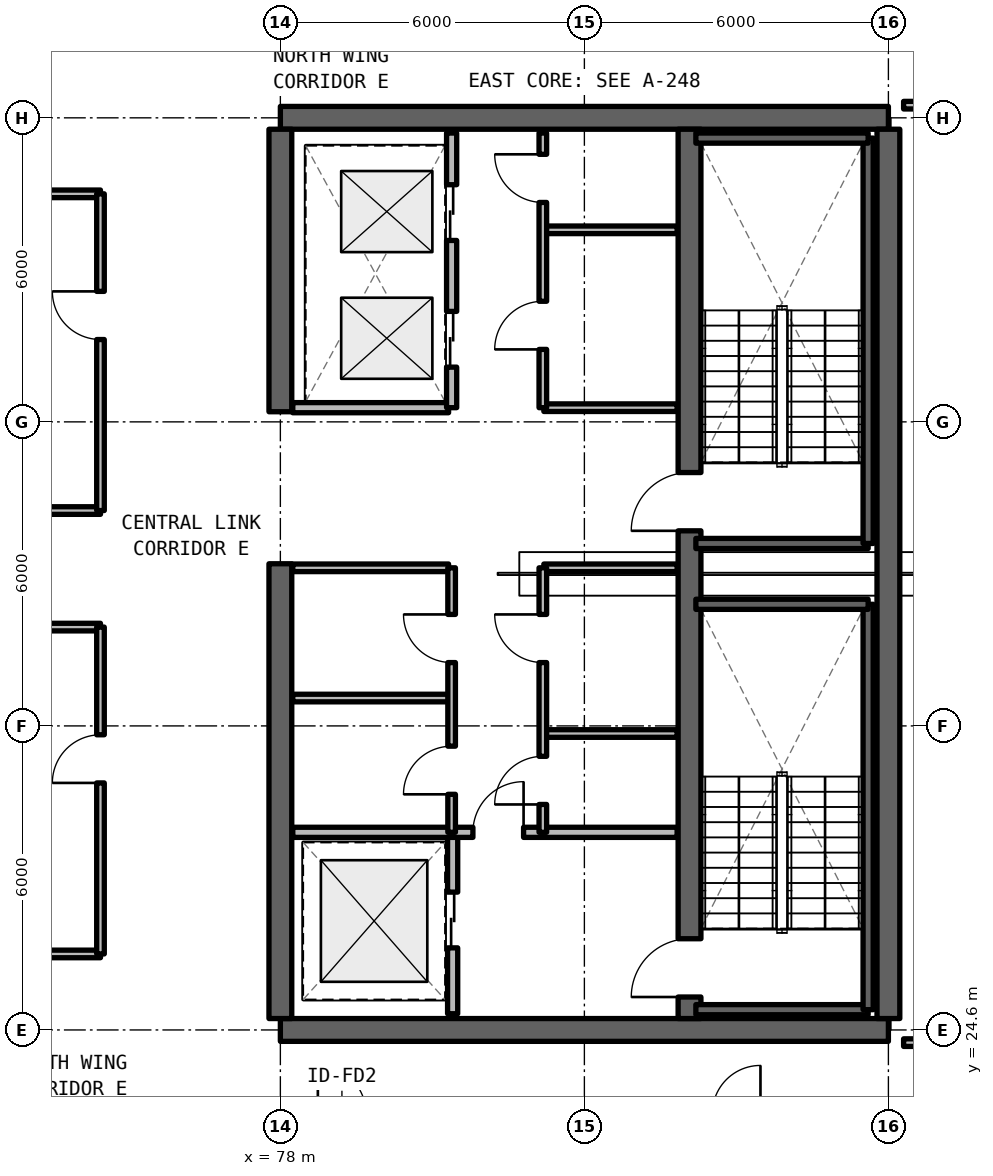
"""IFC4 building model, lengths in metres.
Left out: names, types, materials, properties, quantities, classifications, styles, units other than length and angle.
Written with IfcOpenShell. Run it as: python <this file> out.ifc"""

import sys

from ifc_helpers import new_model, si_unit, direction, frame, frame_2d, origin, place, context, subcontext, project, spatial, rectangle, extrude, element, fill, save


model = new_model("IFC4")
c1 = context("Model", 3, precision=1e-05, world=origin(), true_north=direction((0.0, 1.0)))
c2 = subcontext(c1, "Body", "Model", "MODEL_VIEW")
j1 = project(units=[si_unit("LENGTHUNIT", "METRE"), si_unit("PLANEANGLEUNIT", "RADIAN")], contexts=[c1])
p1 = place(None, origin())
s1 = spatial("IfcSite", under=j1, at=p1, CompositionType="ELEMENT")
p2 = place(p1, origin())
s2 = spatial("IfcBuilding", under=s1, at=p2, CompositionType="ELEMENT")
p3 = place(p2, frame((0.0, 0.0, 246.18)))
s3 = spatial("IfcBuildingStorey", under=s2, at=p3, CompositionType="ELEMENT", Elevation=246.18)
for number, where, z_axis, x_axis in (
    (1, (78.0, 24.6, 0.0), (0.0, 0.0, 1.0), (1.0, 0.0, 0.0)),
    (2, (90.0, 42.6, 0.0), (0.0, 0.0, 1.0), (-1.0, 0.0, 0.0)),
):
    element("IfcWall", number, at=place(p3, frame(where, z_axis=z_axis, x_axis=x_axis)), inside=s3, PredefinedType="SHEAR", context=c2, shape_type="SweptSolid", body=[
        extrude(rectangle(XDim=12.0, YDim=0.45, at=frame_2d((6.0, 0.0))), origin(), (0.0, 0.0, 1.0), 3.63),
    ])
p4 = place(p3, frame((90.0, 24.825, 0.0), z_axis=(0.0, 0.0, 1.0), x_axis=(0.0, 1.0, 0.0)))
e3 = element("IfcWall", 3, at=p4, inside=s3, PredefinedType="SHEAR", context=c2, shape_type="SweptSolid", body=[
    extrude(rectangle(XDim=17.55, YDim=0.45, at=frame_2d((8.775, 0.0))), origin(), (0.0, 0.0, 1.0), 3.63),
])
p5 = place(p3, frame((78.0, 24.825, 0.0), z_axis=(0.0, 0.0, 1.0), x_axis=(0.0, 1.0, 0.0)))
e4 = element("IfcWall", 4, at=p5, inside=s3, PredefinedType="SHEAR", context=c2, shape_type="SweptSolid", body=[
    extrude(rectangle(XDim=8.975, YDim=0.45, at=frame_2d((4.488, 0.0))), origin(), (0.0, 0.0, 1.0), 3.63),
])
p6 = place(p3, frame((78.0, 36.8, 0.0), z_axis=(0.0, 0.0, 1.0), x_axis=(0.0, 1.0, 0.0)))
e5 = element("IfcWall", 5, at=p6, inside=s3, PredefinedType="SHEAR", context=c2, shape_type="SweptSolid", body=[
    extrude(rectangle(XDim=5.575, YDim=0.45, at=frame_2d((2.788, 0.0))), origin(), (0.0, 0.0, 1.0), 3.63),
])
p7 = place(p3, frame((86.075, 24.825, 0.0), z_axis=(0.0, 0.0, 1.0), x_axis=(0.0, 1.0, 0.0)))
e6 = element("IfcWall", 6, at=p7, inside=s3, PredefinedType="SHEAR", context=c2, shape_type="SweptSolid", body=[
    extrude(rectangle(XDim=17.55, YDim=0.45, at=frame_2d((8.775, 0.0))), origin(), (0.0, 0.0, 1.0), 3.63),
])
p8 = place(p7, frame((0.425, 0.0, 0.0)))
e7 = element("IfcOpeningElement", 7, at=p8, cuts=e6, PredefinedType="OPENING", context=c2, shape_type="SweptSolid", body=[
    extrude(rectangle(XDim=1.15, YDim=2.15, at=frame_2d((0.575, 1.075))), frame((0.0, 0.235, 0.0), z_axis=(0.0, -1.0, 0.0), x_axis=(1.0, 0.0, 0.0)), (0.0, 0.0, 1.0), 0.47),
])
p9 = place(p7, frame((9.625, 0.0, 0.0)))
e8 = element("IfcOpeningElement", 8, at=p9, cuts=e6, PredefinedType="OPENING", context=c2, shape_type="SweptSolid", body=[
    extrude(rectangle(XDim=1.15, YDim=2.15, at=frame_2d((0.575, 1.075))), frame((0.0, 0.235, 0.0), z_axis=(0.0, -1.0, 0.0), x_axis=(1.0, 0.0, 0.0)), (0.0, 0.0, 1.0), 0.47),
])
p10 = place(p3, frame((81.4, 24.92, 0.0), z_axis=(0.0, 0.0, 1.0), x_axis=(0.0, 1.0, 0.0)))
e9 = element("IfcWall", 9, at=p10, inside=s3, PredefinedType="SOLIDWALL", context=c2, shape_type="SweptSolid", body=[
    extrude(rectangle(XDim=3.58, YDim=0.2, at=frame_2d((1.79, 0.0))), origin(), (0.0, 0.0, 1.0), 2.63),
])
p11 = place(p10, frame((1.3, 0.0, 0.0)))
e10 = element("IfcOpeningElement", 10, at=p11, cuts=e9, PredefinedType="OPENING", context=c2, shape_type="SweptSolid", body=[
    extrude(rectangle(XDim=1.1, YDim=2.2, at=frame_2d((0.55, 1.1))), frame((0.0, 0.11, 0.0), z_axis=(0.0, -1.0, 0.0), x_axis=(1.0, 0.0, 0.0)), (0.0, 0.0, 1.0), 0.22),
])
p12 = place(p3, frame((78.245, 28.5, 0.0), z_axis=(0.0, 0.0, 1.0), x_axis=(1.0, 0.0, 0.0)))
e11 = element("IfcWall", 11, at=p12, inside=s3, PredefinedType="SOLIDWALL", context=c2, shape_type="SweptSolid", body=[
    extrude(rectangle(XDim=7.585, YDim=0.2, at=frame_2d((3.792, 0.0))), origin(), (0.0, 0.0, 1.0), 2.63),
])
p13 = place(p12, frame((3.555, 0.0, 0.0)))
e12 = element("IfcOpeningElement", 12, at=p13, cuts=e11, PredefinedType="OPENING", context=c2, shape_type="SweptSolid", body=[
    extrude(rectangle(XDim=1.0, YDim=2.15, at=frame_2d((0.5, 1.075))), frame((0.0, 0.11, 0.0), z_axis=(0.0, -1.0, 0.0), x_axis=(1.0, 0.0, 0.0)), (0.0, 0.0, 1.0), 0.22),
])
for number, where, z_axis, x_axis in (
    (13, (83.2, 30.45, 0.0), (0.0, 0.0, 1.0), (1.0, 0.0, 0.0)),
    (14, (83.2, 33.72, 0.0), (0.0, 0.0, 1.0), (1.0, 0.0, 0.0)),
):
    element("IfcWall", number, at=place(p3, frame(where, z_axis=z_axis, x_axis=x_axis)), inside=s3, PredefinedType="SOLIDWALL", context=c2, shape_type="SweptSolid", body=[
        extrude(rectangle(XDim=2.63, YDim=0.15, at=frame_2d((1.315, 0.0))), origin(), (0.0, 0.0, 1.0), 2.63),
    ])
p14 = place(p3, frame((83.18, 28.5, 0.0), z_axis=(0.0, 0.0, 1.0), x_axis=(0.0, 1.0, 0.0)))
e15 = element("IfcWall", 15, at=p14, inside=s3, PredefinedType="SOLIDWALL", context=c2, shape_type="SweptSolid", body=[
    extrude(rectangle(XDim=5.22, YDim=0.15, at=frame_2d((2.61, 0.0))), origin(), (0.0, 0.0, 1.0), 2.63),
])
p15 = place(p14, frame((0.55, 0.0, 0.0)))
e16 = element("IfcOpeningElement", 16, at=p15, cuts=e15, PredefinedType="OPENING", context=c2, shape_type="SweptSolid", body=[
    extrude(rectangle(XDim=0.95, YDim=2.15, at=frame_2d((0.475, 1.075))), frame((0.0, 0.085, 0.0), z_axis=(0.0, -1.0, 0.0), x_axis=(1.0, 0.0, 0.0)), (0.0, 0.0, 1.0), 0.17),
])
p16 = place(p14, frame((3.35, 0.0, 0.0)))
e17 = element("IfcOpeningElement", 17, at=p16, cuts=e15, PredefinedType="OPENING", context=c2, shape_type="SweptSolid", body=[
    extrude(rectangle(XDim=0.95, YDim=2.15, at=frame_2d((0.475, 1.075))), frame((0.0, 0.085, 0.0), z_axis=(0.0, -1.0, 0.0), x_axis=(1.0, 0.0, 0.0)), (0.0, 0.0, 1.0), 0.17),
])
for number, where, z_axis, x_axis in (
    (18, (78.245, 31.15, 0.0), (0.0, 0.0, 1.0), (1.0, 0.0, 0.0)),
    (19, (78.245, 33.72, 0.0), (0.0, 0.0, 1.0), (1.0, 0.0, 0.0)),
):
    element("IfcWall", number, at=place(p3, frame(where, z_axis=z_axis, x_axis=x_axis)), inside=s3, PredefinedType="SOLIDWALL", context=c2, shape_type="SweptSolid", body=[
        extrude(rectangle(XDim=3.075, YDim=0.15, at=frame_2d((1.538, 0.0))), origin(), (0.0, 0.0, 1.0), 2.63),
    ])
p17 = place(p3, frame((81.38, 28.5, 0.0), z_axis=(0.0, 0.0, 1.0), x_axis=(0.0, 1.0, 0.0)))
e20 = element("IfcWall", 20, at=p17, inside=s3, PredefinedType="SOLIDWALL", context=c2, shape_type="SweptSolid", body=[
    extrude(rectangle(XDim=5.22, YDim=0.15, at=frame_2d((2.61, 0.0))), origin(), (0.0, 0.0, 1.0), 2.63),
])
p18 = place(p17, frame((0.75, 0.0, 0.0)))
e21 = element("IfcOpeningElement", 21, at=p18, cuts=e20, PredefinedType="OPENING", context=c2, shape_type="SweptSolid", body=[
    extrude(rectangle(XDim=0.95, YDim=2.15, at=frame_2d((0.475, 1.075))), frame((0.0, 0.085, 0.0), z_axis=(0.0, -1.0, 0.0), x_axis=(1.0, 0.0, 0.0)), (0.0, 0.0, 1.0), 0.17),
])
p19 = place(p17, frame((3.35, 0.0, 0.0)))
e22 = element("IfcOpeningElement", 22, at=p19, cuts=e20, PredefinedType="OPENING", context=c2, shape_type="SweptSolid", body=[
    extrude(rectangle(XDim=0.95, YDim=2.15, at=frame_2d((0.475, 1.075))), frame((0.0, 0.085, 0.0), z_axis=(0.0, -1.0, 0.0), x_axis=(1.0, 0.0, 0.0)), (0.0, 0.0, 1.0), 0.17),
])
for number, where, z_axis, x_axis in (
    (23, (83.2, 36.88, 0.0), (0.0, 0.0, 1.0), (1.0, 0.0, 0.0)),
    (24, (83.2, 40.39, 0.0), (0.0, 0.0, 1.0), (1.0, 0.0, 0.0)),
):
    element("IfcWall", number, at=place(p3, frame(where, z_axis=z_axis, x_axis=x_axis)), inside=s3, PredefinedType="SOLIDWALL", context=c2, shape_type="SweptSolid", body=[
        extrude(rectangle(XDim=2.63, YDim=0.15, at=frame_2d((1.315, 0.0))), origin(), (0.0, 0.0, 1.0), 2.63),
    ])
p20 = place(p3, frame((83.18, 36.88, 0.0), z_axis=(0.0, 0.0, 1.0), x_axis=(0.0, 1.0, 0.0)))
e25 = element("IfcWall", 25, at=p20, inside=s3, PredefinedType="SOLIDWALL", context=c2, shape_type="SweptSolid", body=[
    extrude(rectangle(XDim=5.42, YDim=0.15, at=frame_2d((2.71, 0.0))), origin(), (0.0, 0.0, 1.0), 2.63),
])
p21 = place(p20, frame((1.15, 0.0, 0.0)))
e26 = element("IfcOpeningElement", 26, at=p21, cuts=e25, PredefinedType="OPENING", context=c2, shape_type="SweptSolid", body=[
    extrude(rectangle(XDim=0.95, YDim=2.15, at=frame_2d((0.475, 1.075))), frame((0.0, 0.085, 0.0), z_axis=(0.0, -1.0, 0.0), x_axis=(1.0, 0.0, 0.0)), (0.0, 0.0, 1.0), 0.17),
])
p22 = place(p20, frame((4.05, 0.0, 0.0)))
e27 = element("IfcOpeningElement", 27, at=p22, cuts=e25, PredefinedType="OPENING", context=c2, shape_type="SweptSolid", body=[
    extrude(rectangle(XDim=0.95, YDim=2.15, at=frame_2d((0.475, 1.075))), frame((0.0, 0.085, 0.0), z_axis=(0.0, -1.0, 0.0), x_axis=(1.0, 0.0, 0.0)), (0.0, 0.0, 1.0), 0.17),
])
p23 = place(p3, frame((78.245, 36.88, 0.0), z_axis=(0.0, 0.0, 1.0), x_axis=(1.0, 0.0, 0.0)))
e28 = element("IfcWall", 28, at=p23, inside=s3, PredefinedType="SOLIDWALL", context=c2, shape_type="SweptSolid", body=[
    extrude(rectangle(XDim=3.075, YDim=0.2, at=frame_2d((1.538, 0.0))), origin(), (0.0, 0.0, 1.0), 2.63),
])
p24 = place(p3, frame((81.38, 36.88, 0.0), z_axis=(0.0, 0.0, 1.0), x_axis=(0.0, 1.0, 0.0)))
e29 = element("IfcWall", 29, at=p24, inside=s3, PredefinedType="SOLIDWALL", context=c2, shape_type="SweptSolid", body=[
    extrude(rectangle(XDim=5.42, YDim=0.2, at=frame_2d((2.71, 0.0))), origin(), (0.0, 0.0, 1.0), 2.63),
])
p25 = place(p24, frame((0.8, 0.0, 0.0)))
e30 = element("IfcOpeningElement", 30, at=p25, cuts=e29, PredefinedType="OPENING", context=c2, shape_type="SweptSolid", body=[
    extrude(rectangle(XDim=1.1, YDim=2.2, at=frame_2d((0.55, 1.1))), frame((0.0, 0.11, 0.0), z_axis=(0.0, -1.0, 0.0), x_axis=(1.0, 0.0, 0.0)), (0.0, 0.0, 1.0), 0.22),
])
p26 = place(p24, frame((3.3, 0.0, 0.0)))
e31 = element("IfcOpeningElement", 31, at=p26, cuts=e29, PredefinedType="OPENING", context=c2, shape_type="SweptSolid", body=[
    extrude(rectangle(XDim=1.1, YDim=2.2, at=frame_2d((0.55, 1.1))), frame((0.0, 0.11, 0.0), z_axis=(0.0, -1.0, 0.0), x_axis=(1.0, 0.0, 0.0)), (0.0, 0.0, 1.0), 0.22),
])
p27 = place(p3, frame((90.3, 24.35, 0.0), z_axis=(0.0, 0.0, 1.0), x_axis=(1.0, 0.0, 0.0)))
e32 = element("IfcWall", 32, at=p27, inside=s3, PredefinedType="SOLIDWALL", context=c2, shape_type="SweptSolid", body=[
    extrude(rectangle(XDim=8.52, YDim=0.15, at=frame_2d((4.26, 0.0))), origin(), (0.0, 0.0, 1.0), 2.63),
])
p28 = place(p27, frame((0.975, 0.0, 0.0)))
e33 = element("IfcOpeningElement", 33, at=p28, cuts=e32, PredefinedType="OPENING", context=c2, shape_type="SweptSolid", body=[
    extrude(rectangle(XDim=0.95, YDim=2.15, at=frame_2d((0.475, 1.075))), frame((0.0, 0.085, 0.0), z_axis=(0.0, -1.0, 0.0), x_axis=(1.0, 0.0, 0.0)), (0.0, 0.0, 1.0), 0.17),
])
p29 = place(p3, frame((90.3, 42.85, 0.0), z_axis=(0.0, 0.0, 1.0), x_axis=(1.0, 0.0, 0.0)))
e34 = element("IfcWall", 34, at=p29, inside=s3, PredefinedType="SOLIDWALL", context=c2, shape_type="SweptSolid", body=[
    extrude(rectangle(XDim=8.52, YDim=0.15, at=frame_2d((4.26, 0.0))), origin(), (0.0, 0.0, 1.0), 2.63),
])
for number, where, z_axis, x_axis in (
    (35, (66.0, 26.1, 0.0), (0.0, 0.0, 1.0), (1.0, 0.0, 0.0)),
    (36, (66.0, 32.55, 0.0), (0.0, 0.0, 1.0), (1.0, 0.0, 0.0)),
):
    element("IfcWall", number, at=place(p3, frame(where, z_axis=z_axis, x_axis=x_axis)), inside=s3, PredefinedType="SOLIDWALL", context=c2, shape_type="SweptSolid", body=[
        extrude(rectangle(XDim=8.45, YDim=0.15, at=frame_2d((4.225, 0.0))), origin(), (0.0, 0.0, 1.0), 2.63),
    ])
p30 = place(p3, frame((74.45, 26.1, 0.0), z_axis=(0.0, 0.0, 1.0), x_axis=(0.0, 1.0, 0.0)))
e37 = element("IfcWall", 37, at=p30, inside=s3, PredefinedType="SOLIDWALL", context=c2, shape_type="SweptSolid", body=[
    extrude(rectangle(XDim=6.45, YDim=0.15, at=frame_2d((3.225, 0.0))), origin(), (0.0, 0.0, 1.0), 2.63),
])
p31 = place(p30, frame((3.375, 0.0, 0.0)))
e38 = element("IfcOpeningElement", 38, at=p31, cuts=e37, PredefinedType="OPENING", context=c2, shape_type="SweptSolid", body=[
    extrude(rectangle(XDim=0.95, YDim=2.15, at=frame_2d((0.475, 1.075))), frame((0.0, 0.085, 0.0), z_axis=(0.0, -1.0, 0.0), x_axis=(1.0, 0.0, 0.0)), (0.0, 0.0, 1.0), 0.17),
])
for number, where, z_axis, x_axis in (
    (39, (66.0, 34.85, 0.0), (0.0, 0.0, 1.0), (1.0, 0.0, 0.0)),
    (40, (66.0, 41.1, 0.0), (0.0, 0.0, 1.0), (1.0, 0.0, 0.0)),
):
    element("IfcWall", number, at=place(p3, frame(where, z_axis=z_axis, x_axis=x_axis)), inside=s3, PredefinedType="SOLIDWALL", context=c2, shape_type="SweptSolid", body=[
        extrude(rectangle(XDim=8.45, YDim=0.15, at=frame_2d((4.225, 0.0))), origin(), (0.0, 0.0, 1.0), 2.63),
    ])
p32 = place(p3, frame((74.45, 34.85, 0.0), z_axis=(0.0, 0.0, 1.0), x_axis=(0.0, 1.0, 0.0)))
e41 = element("IfcWall", 41, at=p32, inside=s3, PredefinedType="SOLIDWALL", context=c2, shape_type="SweptSolid", body=[
    extrude(rectangle(XDim=6.25, YDim=0.15, at=frame_2d((3.125, 0.0))), origin(), (0.0, 0.0, 1.0), 2.63),
])
p33 = place(p32, frame((3.375, 0.0, 0.0)))
e42 = element("IfcOpeningElement", 42, at=p33, cuts=e41, PredefinedType="OPENING", context=c2, shape_type="SweptSolid", body=[
    extrude(rectangle(XDim=0.95, YDim=2.15, at=frame_2d((0.475, 1.075))), frame((0.0, 0.085, 0.0), z_axis=(0.0, -1.0, 0.0), x_axis=(1.0, 0.0, 0.0)), (0.0, 0.0, 1.0), 0.17),
])
p34 = place(p3, frame((86.2, 25.0, 0.0), z_axis=(0.0, 0.0, 1.0), x_axis=(1.0, 0.0, 0.0)))
e43 = element("IfcWall", 43, at=p34, inside=s3, PredefinedType="SOLIDWALL", context=c2, shape_type="SweptSolid", body=[
    extrude(rectangle(XDim=3.4, YDim=0.2, at=frame_2d((1.7, 0.0))), origin(), (0.0, 0.0, 1.0), 3.63),
])
p35 = place(p3, frame((89.6, 25.0, 0.0), z_axis=(0.0, 0.0, 1.0), x_axis=(0.0, 1.0, 0.0)))
e44 = element("IfcWall", 44, at=p35, inside=s3, PredefinedType="SOLIDWALL", context=c2, shape_type="SweptSolid", body=[
    extrude(rectangle(XDim=8.0, YDim=0.2, at=frame_2d((4.0, 0.0))), origin(), (0.0, 0.0, 1.0), 3.63),
])
for number, where, z_axis, x_axis in (
    (45, (89.6, 33.0, 0.0), (0.0, 0.0, 1.0), (-1.0, 0.0, 0.0)),
    (46, (86.2, 34.2, 0.0), (0.0, 0.0, 1.0), (1.0, 0.0, 0.0)),
):
    element("IfcWall", number, at=place(p3, frame(where, z_axis=z_axis, x_axis=x_axis)), inside=s3, PredefinedType="SOLIDWALL", context=c2, shape_type="SweptSolid", body=[
        extrude(rectangle(XDim=3.4, YDim=0.2, at=frame_2d((1.7, 0.0))), origin(), (0.0, 0.0, 1.0), 3.63),
    ])
p36 = place(p3, frame((89.6, 34.2, 0.0), z_axis=(0.0, 0.0, 1.0), x_axis=(0.0, 1.0, 0.0)))
e47 = element("IfcWall", 47, at=p36, inside=s3, PredefinedType="SOLIDWALL", context=c2, shape_type="SweptSolid", body=[
    extrude(rectangle(XDim=8.0, YDim=0.2, at=frame_2d((4.0, 0.0))), origin(), (0.0, 0.0, 1.0), 3.63),
])
p37 = place(p3, frame((89.6, 42.2, 0.0), z_axis=(0.0, 0.0, 1.0), x_axis=(-1.0, 0.0, 0.0)))
e48 = element("IfcWall", 48, at=p37, inside=s3, PredefinedType="SOLIDWALL", context=c2, shape_type="SweptSolid", body=[
    extrude(rectangle(XDim=3.4, YDim=0.2, at=frame_2d((1.7, 0.0))), origin(), (0.0, 0.0, 1.0), 3.63),
])
p38 = place(p11, origin())
e49 = element("IfcDoor", 49, at=p38, inside=s3, OperationType="SLIDING_TO_LEFT", PredefinedType="DOOR", context=c2, shape_type="SweptSolid", body=[
    extrude(rectangle(XDim=1.1, YDim=2.2, at=frame_2d((0.55, 1.1))), frame((0.0, 0.025, 0.0), z_axis=(0.0, -1.0, 0.0), x_axis=(1.0, 0.0, 0.0)), (0.0, 0.0, 1.0), 0.05),
])
fill(e10, e49)
p39 = place(p13, origin())
e50 = element("IfcDoor", 50, at=p39, inside=s3, OperationType="SINGLE_SWING_RIGHT", PredefinedType="DOOR", context=c2, shape_type="SweptSolid", body=[
    extrude(rectangle(XDim=1.0, YDim=2.15, at=frame_2d((0.5, 1.075))), frame((0.0, 0.025, 0.0), z_axis=(0.0, -1.0, 0.0), x_axis=(1.0, 0.0, 0.0)), (0.0, 0.0, 1.0), 0.05),
])
fill(e12, e50)
p40 = place(p15, origin())
e51 = element("IfcDoor", 51, at=p40, inside=s3, OperationType="SINGLE_SWING_LEFT", PredefinedType="DOOR", context=c2, shape_type="SweptSolid", body=[
    extrude(rectangle(XDim=0.95, YDim=2.15, at=frame_2d((0.475, 1.075))), frame((0.0, 0.025, 0.0), z_axis=(0.0, -1.0, 0.0), x_axis=(1.0, 0.0, 0.0)), (0.0, 0.0, 1.0), 0.05),
])
fill(e16, e51)
p41 = place(p16, origin())
e52 = element("IfcDoor", 52, at=p41, inside=s3, OperationType="SINGLE_SWING_RIGHT", PredefinedType="DOOR", context=c2, shape_type="SweptSolid", body=[
    extrude(rectangle(XDim=0.95, YDim=2.15, at=frame_2d((0.475, 1.075))), frame((0.0, 0.025, 0.0), z_axis=(0.0, -1.0, 0.0), x_axis=(1.0, 0.0, 0.0)), (0.0, 0.0, 1.0), 0.05),
])
fill(e17, e52)
p42 = place(p18, origin())
e53 = element("IfcDoor", 53, at=p42, inside=s3, OperationType="SINGLE_SWING_LEFT", PredefinedType="DOOR", context=c2, shape_type="SweptSolid", body=[
    extrude(rectangle(XDim=0.95, YDim=2.15, at=frame_2d((0.475, 1.075))), frame((0.0, 0.025, 0.0), z_axis=(0.0, -1.0, 0.0), x_axis=(1.0, 0.0, 0.0)), (0.0, 0.0, 1.0), 0.05),
])
fill(e21, e53)
p43 = place(p19, origin())
e54 = element("IfcDoor", 54, at=p43, inside=s3, OperationType="SINGLE_SWING_RIGHT", PredefinedType="DOOR", context=c2, shape_type="SweptSolid", body=[
    extrude(rectangle(XDim=0.95, YDim=2.15, at=frame_2d((0.475, 1.075))), frame((0.0, 0.025, 0.0), z_axis=(0.0, -1.0, 0.0), x_axis=(1.0, 0.0, 0.0)), (0.0, 0.0, 1.0), 0.05),
])
fill(e22, e54)
p44 = place(p21, origin())
e55 = element("IfcDoor", 55, at=p44, inside=s3, OperationType="SINGLE_SWING_LEFT", PredefinedType="DOOR", context=c2, shape_type="SweptSolid", body=[
    extrude(rectangle(XDim=0.95, YDim=2.15, at=frame_2d((0.475, 1.075))), frame((0.0, 0.025, 0.0), z_axis=(0.0, -1.0, 0.0), x_axis=(1.0, 0.0, 0.0)), (0.0, 0.0, 1.0), 0.05),
])
fill(e26, e55)
p45 = place(p22, origin())
e56 = element("IfcDoor", 56, at=p45, inside=s3, OperationType="SINGLE_SWING_RIGHT", PredefinedType="DOOR", context=c2, shape_type="SweptSolid", body=[
    extrude(rectangle(XDim=0.95, YDim=2.15, at=frame_2d((0.475, 1.075))), frame((0.0, 0.025, 0.0), z_axis=(0.0, -1.0, 0.0), x_axis=(1.0, 0.0, 0.0)), (0.0, 0.0, 1.0), 0.05),
])
fill(e27, e56)
p46 = place(p25, origin())
e57 = element("IfcDoor", 57, at=p46, inside=s3, OperationType="SLIDING_TO_LEFT", PredefinedType="DOOR", context=c2, shape_type="SweptSolid", body=[
    extrude(rectangle(XDim=1.1, YDim=2.2, at=frame_2d((0.55, 1.1))), frame((0.0, 0.025, 0.0), z_axis=(0.0, -1.0, 0.0), x_axis=(1.0, 0.0, 0.0)), (0.0, 0.0, 1.0), 0.05),
])
fill(e30, e57)
p47 = place(p26, origin())
e58 = element("IfcDoor", 58, at=p47, inside=s3, OperationType="SLIDING_TO_RIGHT", PredefinedType="DOOR", context=c2, shape_type="SweptSolid", body=[
    extrude(rectangle(XDim=1.1, YDim=2.2, at=frame_2d((0.55, 1.1))), frame((0.0, 0.025, 0.0), z_axis=(0.0, -1.0, 0.0), x_axis=(1.0, 0.0, 0.0)), (0.0, 0.0, 1.0), 0.05),
])
fill(e31, e58)
p48 = place(p31, origin())
e59 = element("IfcDoor", 59, at=p48, inside=s3, OperationType="SINGLE_SWING_LEFT", PredefinedType="DOOR", context=c2, shape_type="SweptSolid", body=[
    extrude(rectangle(XDim=0.95, YDim=2.15, at=frame_2d((0.475, 1.075))), frame((0.0, 0.025, 0.0), z_axis=(0.0, -1.0, 0.0), x_axis=(1.0, 0.0, 0.0)), (0.0, 0.0, 1.0), 0.05),
])
fill(e38, e59)
p49 = place(p33, origin())
e60 = element("IfcDoor", 60, at=p49, inside=s3, OperationType="SINGLE_SWING_RIGHT", PredefinedType="DOOR", context=c2, shape_type="SweptSolid", body=[
    extrude(rectangle(XDim=0.95, YDim=2.15, at=frame_2d((0.475, 1.075))), frame((0.0, 0.025, 0.0), z_axis=(0.0, -1.0, 0.0), x_axis=(1.0, 0.0, 0.0)), (0.0, 0.0, 1.0), 0.05),
])
fill(e42, e60)
p50 = place(p8, origin())
e61 = element("IfcDoor", 61, at=p50, inside=s3, OperationType="SINGLE_SWING_LEFT", PredefinedType="DOOR", context=c2, shape_type="SweptSolid", body=[
    extrude(rectangle(XDim=1.15, YDim=2.15, at=frame_2d((0.575, 1.075))), frame((0.0, 0.025, 0.0), z_axis=(0.0, -1.0, 0.0), x_axis=(1.0, 0.0, 0.0)), (0.0, 0.0, 1.0), 0.05),
])
fill(e7, e61)
p51 = place(p9, origin())
e62 = element("IfcDoor", 62, at=p51, inside=s3, OperationType="SINGLE_SWING_RIGHT", PredefinedType="DOOR", context=c2, shape_type="SweptSolid", body=[
    extrude(rectangle(XDim=1.15, YDim=2.15, at=frame_2d((0.575, 1.075))), frame((0.0, 0.025, 0.0), z_axis=(0.0, -1.0, 0.0), x_axis=(1.0, 0.0, 0.0)), (0.0, 0.0, 1.0), 0.05),
])
fill(e8, e62)
save(model, sys.argv[1])
